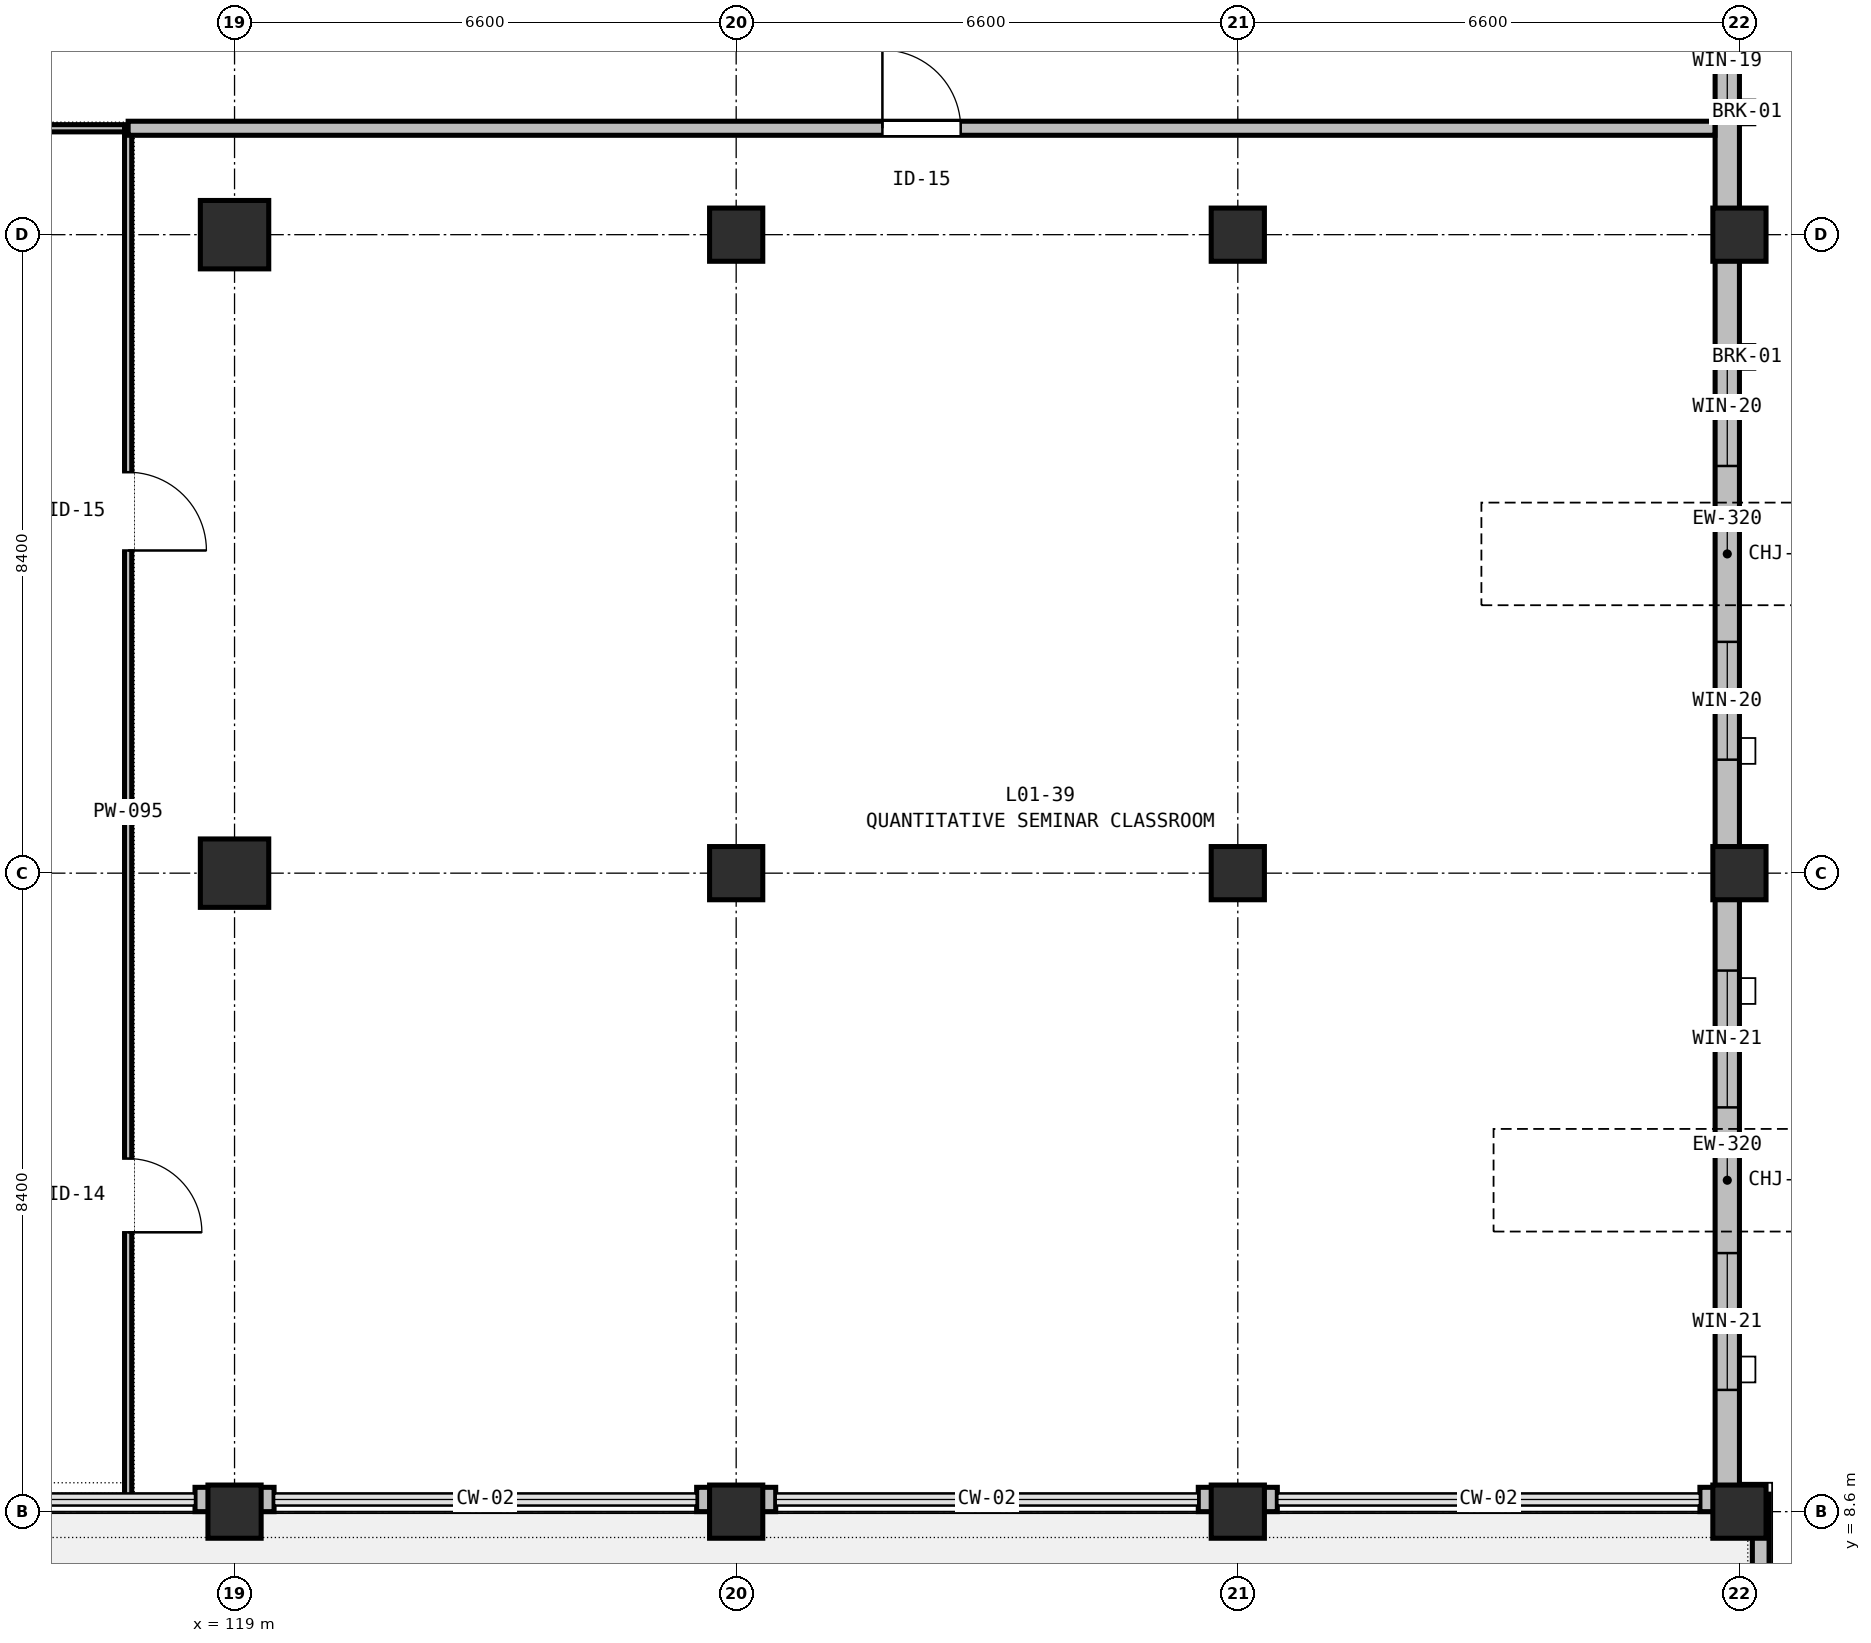
"""IFC4 building model, lengths in metres.
Left out: names, types, materials, properties, quantities, classifications, styles, units other than length and angle.
Written with IfcOpenShell. Run it as: python <this file> out.ifc"""

import sys

from ifc_helpers import new_model, si_unit, direction, frame, frame_2d, origin, origin_2d, place, context, subcontext, project, spatial, rectangle, extrude, element, fill, save


model = new_model("IFC4")
c1 = context("Model", 3, precision=1e-05, world=origin(), true_north=direction((0.0, 1.0)))
c2 = subcontext(c1, "Body", "Model", "MODEL_VIEW")
j1 = project(units=[si_unit("LENGTHUNIT", "METRE"), si_unit("PLANEANGLEUNIT", "RADIAN")], contexts=[c1])
p1 = place(None, origin())
s1 = spatial("IfcSite", under=j1, at=p1, CompositionType="ELEMENT")
p2 = place(p1, origin())
s2 = spatial("IfcBuilding", under=s1, at=p2, CompositionType="ELEMENT")
p3 = place(p2, frame((0.0, 0.0, 5.4)))
s3 = spatial("IfcBuildingStorey", under=s2, at=p3, CompositionType="ELEMENT", Elevation=5.4)
p4 = place(p3, frame((119.0, 8.6, 0.0), z_axis=(0.0, 0.0, 1.0), x_axis=(1.0, 0.0, 0.0)))
e1 = element("IfcColumn", 1, at=p4, inside=s3, PredefinedType="COLUMN", context=c2, shape_type="SweptSolid", body=[
    extrude(rectangle(XDim=0.7, YDim=0.7, at=origin_2d()), origin(), (0.0, 0.0, 1.0), 4.8),
])
for number, where, z_axis, x_axis in (
    (2, (119.0, 17.0, 0.0), (0.0, 0.0, 1.0), (1.0, 0.0, 0.0)),
    (3, (119.0, 25.4, 0.0), (0.0, 0.0, 1.0), (1.0, 0.0, 0.0)),
):
    element("IfcColumn", number, at=place(p3, frame(where, z_axis=z_axis, x_axis=x_axis)), inside=s3, PredefinedType="COLUMN", context=c2, shape_type="SweptSolid", body=[
        extrude(rectangle(XDim=0.9, YDim=0.9, at=origin_2d()), origin(), (0.0, 0.0, 1.0), 4.8),
    ])
for number, where, z_axis, x_axis in (
    (4, (125.6, 8.6, 0.0), (0.0, 0.0, 1.0), (1.0, 0.0, 0.0)),
    (5, (125.6, 17.0, 0.0), (0.0, 0.0, 1.0), (1.0, 0.0, 0.0)),
    (6, (125.6, 25.4, 0.0), (0.0, 0.0, 1.0), (1.0, 0.0, 0.0)),
    (7, (132.2, 8.6, 0.0), (0.0, 0.0, 1.0), (1.0, 0.0, 0.0)),
    (8, (132.2, 17.0, 0.0), (0.0, 0.0, 1.0), (1.0, 0.0, 0.0)),
    (9, (132.2, 25.4, 0.0), (0.0, 0.0, 1.0), (1.0, 0.0, 0.0)),
    (10, (138.8, 8.6, 0.0), (0.0, 0.0, 1.0), (1.0, 0.0, 0.0)),
    (11, (138.8, 17.0, 0.0), (0.0, 0.0, 1.0), (1.0, 0.0, 0.0)),
    (12, (138.8, 25.4, 0.0), (0.0, 0.0, 1.0), (1.0, 0.0, 0.0)),
):
    element("IfcColumn", number, at=place(p3, frame(where, z_axis=z_axis, x_axis=x_axis)), inside=s3, PredefinedType="COLUMN", context=c2, shape_type="SweptSolid", body=[
        extrude(rectangle(XDim=0.7, YDim=0.7, at=origin_2d()), origin(), (0.0, 0.0, 1.0), 4.8),
    ])
p5 = place(p3, frame((138.64, 33.8, 0.0), z_axis=(0.0, 0.0, 1.0), x_axis=(0.0, -1.0, 0.0)))
e13 = element("IfcWall", 13, at=p5, inside=s3, PredefinedType="STANDARD", context=c2, shape_type="SweptSolid", body=[
    extrude(rectangle(XDim=8.4, YDim=0.32, at=frame_2d((4.2, 0.0))), origin(), (0.0, 0.0, 1.0), 4.085),
])
p6 = place(p5, frame((1.618, 0.0, 0.75)))
e14 = element("IfcOpeningElement", 14, at=p6, cuts=e13, PredefinedType="OPENING", context=c2, shape_type="SweptSolid", body=[
    extrude(rectangle(XDim=1.3, YDim=2.4, at=frame_2d((0.65, 1.2))), frame((0.0, 0.17, 0.0), z_axis=(0.0, -1.0, 0.0), x_axis=(1.0, 0.0, 0.0)), (0.0, 0.0, 1.0), 0.34),
])
p7 = place(p5, frame((5.46, 0.0, 0.75)))
e15 = element("IfcOpeningElement", 15, at=p7, cuts=e13, PredefinedType="OPENING", context=c2, shape_type="SweptSolid", body=[
    extrude(rectangle(XDim=1.3, YDim=2.4, at=frame_2d((0.65, 1.2))), frame((0.0, 0.17, 0.0), z_axis=(0.0, -1.0, 0.0), x_axis=(1.0, 0.0, 0.0)), (0.0, 0.0, 1.0), 0.34),
])
p8 = place(p3, frame((138.64, 25.4, 0.0), z_axis=(0.0, 0.0, 1.0), x_axis=(0.0, -1.0, 0.0)))
e16 = element("IfcWall", 16, at=p8, inside=s3, PredefinedType="STANDARD", context=c2, shape_type="SweptSolid", body=[
    extrude(rectangle(XDim=8.4, YDim=0.32, at=frame_2d((4.2, 0.0))), origin(), (0.0, 0.0, 1.0), 4.085),
])
p9 = place(p8, frame((1.493, 0.0, 0.75)))
e17 = element("IfcOpeningElement", 17, at=p9, cuts=e16, PredefinedType="OPENING", context=c2, shape_type="SweptSolid", body=[
    extrude(rectangle(XDim=1.55, YDim=2.4, at=frame_2d((0.775, 1.2))), frame((0.0, 0.17, 0.0), z_axis=(0.0, -1.0, 0.0), x_axis=(1.0, 0.0, 0.0)), (0.0, 0.0, 1.0), 0.34),
])
p10 = place(p8, frame((5.357, 0.0, 0.75)))
e18 = element("IfcOpeningElement", 18, at=p10, cuts=e16, PredefinedType="OPENING", context=c2, shape_type="SweptSolid", body=[
    extrude(rectangle(XDim=1.55, YDim=2.4, at=frame_2d((0.775, 1.2))), frame((0.0, 0.17, 0.0), z_axis=(0.0, -1.0, 0.0), x_axis=(1.0, 0.0, 0.0)), (0.0, 0.0, 1.0), 0.34),
])
p11 = place(p3, frame((138.64, 17.0, 0.0), z_axis=(0.0, 0.0, 1.0), x_axis=(0.0, -1.0, 0.0)))
e19 = element("IfcWall", 19, at=p11, inside=s3, PredefinedType="STANDARD", context=c2, shape_type="SweptSolid", body=[
    extrude(rectangle(XDim=8.08, YDim=0.32, at=frame_2d((4.04, 0.0))), origin(), (0.0, 0.0, 1.0), 4.085),
])
p12 = place(p11, frame((1.281, 0.0, 0.75)))
e20 = element("IfcOpeningElement", 20, at=p12, cuts=e19, PredefinedType="OPENING", context=c2, shape_type="SweptSolid", body=[
    extrude(rectangle(XDim=1.8, YDim=2.4, at=frame_2d((0.9, 1.2))), frame((0.0, 0.17, 0.0), z_axis=(0.0, -1.0, 0.0), x_axis=(1.0, 0.0, 0.0)), (0.0, 0.0, 1.0), 0.34),
])
p13 = place(p11, frame((4.998, 0.0, 0.75)))
e21 = element("IfcOpeningElement", 21, at=p13, cuts=e19, PredefinedType="OPENING", context=c2, shape_type="SweptSolid", body=[
    extrude(rectangle(XDim=1.8, YDim=2.4, at=frame_2d((0.9, 1.2))), frame((0.0, 0.17, 0.0), z_axis=(0.0, -1.0, 0.0), x_axis=(1.0, 0.0, 0.0)), (0.0, 0.0, 1.0), 0.34),
])
for number, where, z_axis, x_axis in (
    (22, (138.8, 8.76, 0.0), (0.0, 0.0, 1.0), (-1.0, 0.0, 0.0)),
    (23, (132.72, 8.76, 0.0), (0.0, 0.0, 1.0), (-1.0, 0.0, 0.0)),
    (24, (132.2, 8.76, 0.0), (0.0, 0.0, 1.0), (-1.0, 0.0, 0.0)),
    (25, (126.12, 8.76, 0.0), (0.0, 0.0, 1.0), (-1.0, 0.0, 0.0)),
    (26, (125.6, 8.76, 0.0), (0.0, 0.0, 1.0), (-1.0, 0.0, 0.0)),
    (27, (119.52, 8.76, 0.0), (0.0, 0.0, 1.0), (-1.0, 0.0, 0.0)),
    (28, (119.0, 8.76, 0.0), (0.0, 0.0, 1.0), (-1.0, 0.0, 0.0)),
):
    element("IfcWall", number, at=place(p3, frame(where, z_axis=z_axis, x_axis=x_axis)), inside=s3, PredefinedType="STANDARD", context=c2, shape_type="SweptSolid", body=[
        extrude(rectangle(XDim=0.52, YDim=0.32, at=frame_2d((0.26, 0.0))), origin(), (0.0, 0.0, 1.0), 3.935),
    ])
p14 = place(p3, frame((139.08, 8.83, 0.0), z_axis=(0.0, 0.0, 1.0), x_axis=(0.0, -1.0, 0.0)))
e29 = element("IfcWall", 29, at=p14, inside=s3, PredefinedType="PARAPET", context=c2, shape_type="SweptSolid", body=[
    extrude(rectangle(XDim=9.11, YDim=0.22, at=frame_2d((4.555, 0.0))), origin(), (0.0, 0.0, 1.0), 0.68),
])
p15 = place(p3, frame((99.522, 26.8, 0.0), z_axis=(0.0, 0.0, 1.0), x_axis=(1.0, 0.0, 0.0)))
e30 = element("IfcWall", 30, at=p15, inside=s3, PredefinedType="PARTITIONING", context=c2, shape_type="SweptSolid", body=[
    extrude(rectangle(XDim=18.078, YDim=0.095, at=frame_2d((9.039, 0.0))), origin(), (0.0, 0.0, 1.0), 3.935),
])
p16 = place(p15, frame((8.554, 0.0, 0.0)))
e31 = element("IfcOpeningElement", 31, at=p16, cuts=e30, PredefinedType="OPENING", context=c2, shape_type="SweptSolid", body=[
    extrude(rectangle(XDim=0.97, YDim=2.1, at=frame_2d((0.485, 1.05))), frame((0.0, 0.057, 0.0), z_axis=(0.0, -1.0, 0.0), x_axis=(1.0, 0.0, 0.0)), (0.0, 0.0, 1.0), 0.115),
])
p17 = place(p3, frame((117.6, 26.8, 0.0), z_axis=(0.0, 0.0, 1.0), x_axis=(0.0, -1.0, 0.0)))
e32 = element("IfcWall", 32, at=p17, inside=s3, PredefinedType="PARTITIONING", context=c2, shape_type="SweptSolid", body=[
    extrude(rectangle(XDim=18.0, YDim=0.095, at=frame_2d((9.0, 0.0))), origin(), (0.0, 0.0, 1.0), 3.385),
])
p18 = place(p17, frame((13.555, 0.0, 0.0)))
e33 = element("IfcOpeningElement", 33, at=p18, cuts=e32, PredefinedType="OPENING", context=c2, shape_type="SweptSolid", body=[
    extrude(rectangle(XDim=0.97, YDim=2.1, at=frame_2d((0.485, 1.05))), frame((0.0, 0.057, 0.0), z_axis=(0.0, -1.0, 0.0), x_axis=(1.0, 0.0, 0.0)), (0.0, 0.0, 1.0), 0.115),
])
p19 = place(p17, frame((4.525, 0.0, 0.0)))
e34 = element("IfcOpeningElement", 34, at=p19, cuts=e32, PredefinedType="OPENING", context=c2, shape_type="SweptSolid", body=[
    extrude(rectangle(XDim=1.03, YDim=2.1, at=frame_2d((0.515, 1.05))), frame((0.0, 0.057, 0.0), z_axis=(0.0, -1.0, 0.0), x_axis=(1.0, 0.0, 0.0)), (0.0, 0.0, 1.0), 0.115),
])
p20 = place(p3, frame((117.6, 26.8, 0.0), z_axis=(0.0, 0.0, 1.0), x_axis=(1.0, 0.0, 0.0)))
e35 = element("IfcWall", 35, at=p20, inside=s3, PredefinedType="PARTITIONING", context=c2, shape_type="SweptSolid", body=[
    extrude(rectangle(XDim=20.878, YDim=0.185, at=frame_2d((10.439, 0.0))), origin(), (0.0, 0.0, 1.0), 3.935),
])
p21 = place(p20, frame((9.924, 0.0, 0.0)))
e36 = element("IfcOpeningElement", 36, at=p21, cuts=e35, PredefinedType="OPENING", context=c2, shape_type="SweptSolid", body=[
    extrude(rectangle(XDim=1.03, YDim=2.1, at=frame_2d((0.515, 1.05))), frame((0.0, 0.103, 0.0), z_axis=(0.0, -1.0, 0.0), x_axis=(1.0, 0.0, 0.0)), (0.0, 0.0, 1.0), 0.205),
])
p22 = place(p7, origin())
e37 = element("IfcWindow", 37, at=p22, inside=s3, PartitioningType="SINGLE_PANEL", PredefinedType="WINDOW", context=c2, shape_type="SweptSolid", body=[
    extrude(rectangle(XDim=1.3, YDim=2.4, at=frame_2d((0.65, 1.2))), frame((0.0, 0.03, 0.0), z_axis=(0.0, -1.0, 0.0), x_axis=(1.0, 0.0, 0.0)), (0.0, 0.0, 1.0), 0.06),
])
fill(e15, e37)
p23 = place(p9, origin())
e38 = element("IfcWindow", 38, at=p23, inside=s3, PartitioningType="SINGLE_PANEL", PredefinedType="WINDOW", context=c2, shape_type="SweptSolid", body=[
    extrude(rectangle(XDim=1.55, YDim=2.4, at=frame_2d((0.775, 1.2))), frame((0.0, 0.03, 0.0), z_axis=(0.0, -1.0, 0.0), x_axis=(1.0, 0.0, 0.0)), (0.0, 0.0, 1.0), 0.06),
])
fill(e17, e38)
p24 = place(p10, origin())
e39 = element("IfcWindow", 39, at=p24, inside=s3, PartitioningType="SINGLE_PANEL", PredefinedType="WINDOW", context=c2, shape_type="SweptSolid", body=[
    extrude(rectangle(XDim=1.55, YDim=2.4, at=frame_2d((0.775, 1.2))), frame((0.0, 0.03, 0.0), z_axis=(0.0, -1.0, 0.0), x_axis=(1.0, 0.0, 0.0)), (0.0, 0.0, 1.0), 0.06),
])
fill(e18, e39)
p25 = place(p12, origin())
e40 = element("IfcWindow", 40, at=p25, inside=s3, PartitioningType="SINGLE_PANEL", PredefinedType="WINDOW", context=c2, shape_type="SweptSolid", body=[
    extrude(rectangle(XDim=1.8, YDim=2.4, at=frame_2d((0.9, 1.2))), frame((0.0, 0.03, 0.0), z_axis=(0.0, -1.0, 0.0), x_axis=(1.0, 0.0, 0.0)), (0.0, 0.0, 1.0), 0.06),
])
fill(e20, e40)
p26 = place(p13, origin())
e41 = element("IfcWindow", 41, at=p26, inside=s3, PartitioningType="SINGLE_PANEL", PredefinedType="WINDOW", context=c2, shape_type="SweptSolid", body=[
    extrude(rectangle(XDim=1.8, YDim=2.4, at=frame_2d((0.9, 1.2))), frame((0.0, 0.03, 0.0), z_axis=(0.0, -1.0, 0.0), x_axis=(1.0, 0.0, 0.0)), (0.0, 0.0, 1.0), 0.06),
])
fill(e21, e41)
p27 = place(p18, origin())
e42 = element("IfcDoor", 42, at=p27, inside=s3, OperationType="SINGLE_SWING_RIGHT", PredefinedType="DOOR", context=c2, shape_type="SweptSolid", body=[
    extrude(rectangle(XDim=0.97, YDim=2.1, at=frame_2d((0.485, 1.05))), frame((0.0, 0.025, 0.0), z_axis=(0.0, -1.0, 0.0), x_axis=(1.0, 0.0, 0.0)), (0.0, 0.0, 1.0), 0.05),
])
fill(e33, e42)
p28 = place(p21, origin())
e43 = element("IfcDoor", 43, at=p28, inside=s3, OperationType="SINGLE_SWING_LEFT", PredefinedType="DOOR", context=c2, shape_type="SweptSolid", body=[
    extrude(rectangle(XDim=1.03, YDim=2.1, at=frame_2d((0.515, 1.05))), frame((0.0, 0.025, 0.0), z_axis=(0.0, -1.0, 0.0), x_axis=(1.0, 0.0, 0.0)), (0.0, 0.0, 1.0), 0.05),
])
fill(e36, e43)
p29 = place(p19, origin())
e44 = element("IfcDoor", 44, at=p29, inside=s3, OperationType="SINGLE_SWING_RIGHT", PredefinedType="DOOR", context=c2, shape_type="SweptSolid", body=[
    extrude(rectangle(XDim=1.03, YDim=2.1, at=frame_2d((0.515, 1.05))), frame((0.0, 0.025, 0.0), z_axis=(0.0, -1.0, 0.0), x_axis=(1.0, 0.0, 0.0)), (0.0, 0.0, 1.0), 0.05),
])
fill(e34, e44)
save(model, sys.argv[1])
